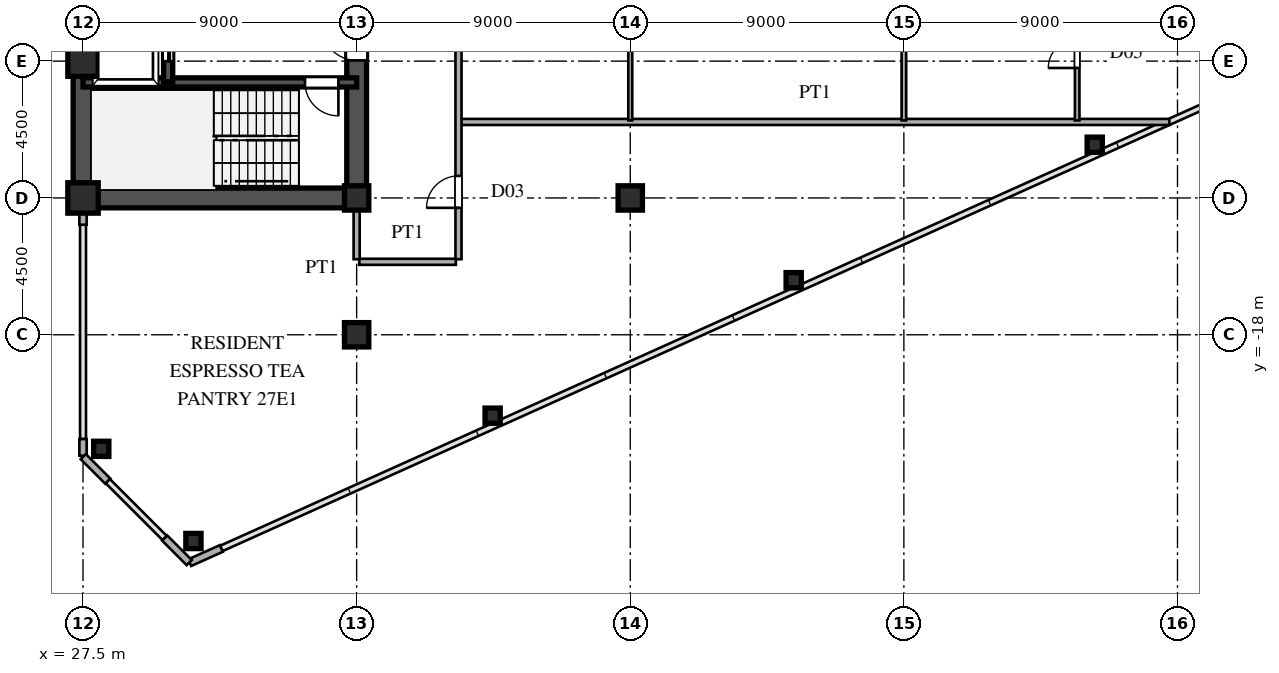
"""IFC4 building model, lengths in metres.
Left out: names, types, materials, properties, quantities, classifications, styles, units other than length and angle.
Written with IfcOpenShell. Run it as: python <this file> out.ifc"""

import sys

from ifc_helpers import new_model, si_unit, direction, frame, frame_2d, origin, origin_2d, place, context, subcontext, project, spatial, rectangle, hollow_rectangle, i_section, extrude, source, transform, mapped, element, fill, save


model = new_model("IFC4")
c1 = context("Model", 3, precision=1e-05, world=origin(), true_north=direction((0.0, 1.0)))
c2 = subcontext(c1, "Body", "Model", "MODEL_VIEW")
j1 = project(units=[si_unit("LENGTHUNIT", "METRE"), si_unit("PLANEANGLEUNIT", "RADIAN")], contexts=[c1])
p1 = place(None, origin())
s1 = spatial("IfcSite", under=j1, at=p1, CompositionType="ELEMENT")
p2 = place(p1, origin())
s2 = spatial("IfcBuilding", under=s1, at=p2, CompositionType="ELEMENT")
p3 = place(p2, frame((0.0, 0.0, 103.2)))
s3 = spatial("IfcBuildingStorey", under=s2, at=p3, CompositionType="ELEMENT", Elevation=103.2)
m1 = source(origin(), c2, "Body", "SweptSolid", [
    extrude(hollow_rectangle(XDim=1.0, YDim=1.0, WallThickness=0.042, at=origin_2d()), origin(), (0.0, 0.0, 1.0), 3.6),
])
for number, where, z_axis, x_axis in (
    (1, (27.5, -13.5, 0.0), (0.0, 0.0, 1.0), (1.0, 0.0, 0.0)),
    (2, (27.5, -9.0, 0.0), (0.0, 0.0, 1.0), (1.0, 0.0, 0.0)),
):
    element("IfcColumn", number, at=place(p3, frame(where, z_axis=z_axis, x_axis=x_axis)), inside=s3, PredefinedType="COLUMN", context=c2, shape_type="MappedRepresentation", body=[
        mapped(m1, transform((0.0, 0.0, 0.0), scale=1.0)),
    ])
m2 = source(origin(), c2, "Body", "SweptSolid", [
    extrude(i_section(OverallWidth=0.8, OverallDepth=0.8, WebThickness=0.032, FlangeThickness=0.05, at=origin_2d()), origin(), (0.0, 0.0, 1.0), 3.6),
])
for number, where, z_axis, x_axis in (
    (3, (36.5, -18.0, 0.0), (0.0, 0.0, 1.0), (1.0, 0.0, 0.0)),
    (4, (36.5, -13.5, 0.0), (0.0, 0.0, 1.0), (1.0, 0.0, 0.0)),
    (5, (45.5, -13.5, 0.0), (0.0, 0.0, 1.0), (1.0, 0.0, 0.0)),
):
    element("IfcColumn", number, at=place(p3, frame(where, z_axis=z_axis, x_axis=x_axis)), inside=s3, PredefinedType="COLUMN", context=c2, shape_type="MappedRepresentation", body=[
        mapped(m2, transform((0.0, 0.0, 0.0), scale=1.0)),
    ])
m3 = source(origin(), c2, "Body", "SweptSolid", [
    extrude(hollow_rectangle(XDim=0.5, YDim=0.5, WallThickness=0.02, at=origin_2d()), origin(), (0.0, 0.0, 1.0), 3.6),
])
for number, where, z_axis, x_axis in (
    (6, (31.131, -24.783, 0.0), (0.0, 0.0, 1.0), (1.0, 0.0, 0.0)),
    (7, (28.1, -21.751, 0.0), (0.0, 0.0, 1.0), (1.0, 0.0, 0.0)),
    (8, (40.973, -20.661, 0.0), (0.0, 0.0, 1.0), (1.0, 0.0, 0.0)),
    (9, (50.875, -16.205, 0.0), (0.0, 0.0, 1.0), (1.0, 0.0, 0.0)),
    (10, (60.778, -11.749, 0.0), (0.0, 0.0, 1.0), (1.0, 0.0, 0.0)),
):
    element("IfcColumn", number, at=place(p3, frame(where, z_axis=z_axis, x_axis=x_axis)), inside=s3, PredefinedType="COLUMN", context=c2, shape_type="MappedRepresentation", body=[
        mapped(m3, transform((0.0, 0.0, 0.0), scale=1.0)),
    ])
p4 = place(p3, frame((31.009, -25.496, 0.0), z_axis=(0.0, 0.0, 1.0), x_axis=(0.911929519623, 0.410346866979, 0.0)))
e11 = element("IfcWall", 11, at=p4, inside=s3, PredefinedType="SOLIDWALL", context=c2, shape_type="SweptSolid", body=[
    extrude(rectangle(XDim=1.14, YDim=0.24, at=frame_2d((0.57, 0.0))), origin(), (0.0, 0.0, 1.0), 3.38),
])
p5 = place(p3, frame((27.5, -21.98, 0.0), z_axis=(0.0, 0.0, 1.0), x_axis=(0.0, 1.0, 0.0)))
e12 = element("IfcWall", 12, at=p5, inside=s3, PredefinedType="SOLIDWALL", context=c2, shape_type="SweptSolid", body=[
    extrude(rectangle(XDim=0.55, YDim=0.24, at=frame_2d((0.275, 0.0))), origin(), (0.0, 0.0, 1.0), 3.38),
])
p6 = place(p3, frame((27.5, -14.38, 0.0), z_axis=(0.0, 0.0, 1.0), x_axis=(0.0, 1.0, 0.0)))
e13 = element("IfcWall", 13, at=p6, inside=s3, PredefinedType="SOLIDWALL", context=c2, shape_type="SweptSolid", body=[
    extrude(rectangle(XDim=0.55, YDim=0.24, at=frame_2d((0.275, 0.0))), origin(), (0.0, 0.0, 1.0), 2.88),
])
for number, where, z_axis, x_axis in (
    (14, (27.507, -22.007, 0.0), (0.0, 0.0, 1.0), (0.707, -0.707, 0.0)),
    (15, (30.187, -24.687, 0.0), (0.0, 0.0, 1.0), (0.707, -0.707, 0.0)),
):
    element("IfcWall", number, at=place(p3, frame(where, z_axis=z_axis, x_axis=x_axis)), inside=s3, PredefinedType="SOLIDWALL", context=c2, shape_type="SweptSolid", body=[
        extrude(rectangle(XDim=1.14, YDim=0.24, at=frame_2d((0.57, 0.0))), origin(), (0.0, 0.0, 1.0), 3.38),
    ])
p7 = place(p3, frame((27.5, -13.5, 0.0), z_axis=(0.0, 0.0, 1.0), x_axis=(0.0, 1.0, 0.0)))
e16 = element("IfcWall", 16, at=p7, inside=s3, PredefinedType="SHEAR", context=c2, shape_type="SweptSolid", body=[
    extrude(rectangle(XDim=12.2, YDim=0.65, at=frame_2d((6.1, 0.0))), origin(), (0.0, 0.0, 1.0), 3.38),
])
p8 = place(p3, frame((27.5, -13.5, 0.0), z_axis=(0.0, 0.0, 1.0), x_axis=(1.0, 0.0, 0.0)))
e17 = element("IfcWall", 17, at=p8, inside=s3, PredefinedType="SHEAR", context=c2, shape_type="SweptSolid", body=[
    extrude(rectangle(XDim=9.0, YDim=0.65, at=frame_2d((4.5, 0.0))), origin(), (0.0, 0.0, 1.0), 3.38),
])
p9 = place(p3, frame((36.5, -13.65, 0.0), z_axis=(0.0, 0.0, 1.0), x_axis=(0.0, 1.0, 0.0)))
e18 = element("IfcWall", 18, at=p9, inside=s3, PredefinedType="SHEAR", context=c2, shape_type="SweptSolid", body=[
    extrude(rectangle(XDim=7.15, YDim=0.65, at=frame_2d((3.575, 0.0))), origin(), (0.0, 0.0, 1.0), 3.38),
])
p10 = place(p9, frame((4.675, 0.0, 0.0)))
e19 = element("IfcOpeningElement", 19, at=p10, cuts=e18, PredefinedType="OPENING", context=c2, shape_type="SweptSolid", body=[
    extrude(rectangle(XDim=1.15, YDim=2.2, at=frame_2d((0.575, 1.1))), frame((0.0, 0.335, 0.0), z_axis=(0.0, -1.0, 0.0), x_axis=(1.0, 0.0, 0.0)), (0.0, 0.0, 1.0), 0.67),
])
p11 = place(p3, frame((27.5, -9.7, 0.0), z_axis=(0.0, 0.0, 1.0), x_axis=(1.0, 0.0, 0.0)))
e20 = element("IfcWall", 20, at=p11, inside=s3, PredefinedType="SHEAR", context=c2, shape_type="SweptSolid", body=[
    extrude(rectangle(XDim=9.0, YDim=0.3, at=frame_2d((4.5, 0.0))), origin(), (0.0, 0.0, 1.0), 3.38),
])
p12 = place(p11, frame((7.3, 0.0, 0.0)))
e21 = element("IfcOpeningElement", 21, at=p12, cuts=e20, PredefinedType="OPENING", context=c2, shape_type="SweptSolid", body=[
    extrude(rectangle(XDim=1.1, YDim=2.2, at=frame_2d((0.55, 1.1))), frame((0.0, 0.16, 0.0), z_axis=(0.0, -1.0, 0.0), x_axis=(1.0, 0.0, 0.0)), (0.0, 0.0, 1.0), 0.32),
])
p13 = place(p3, frame((30.3, -9.68, 0.0), z_axis=(0.0, 0.0, 1.0), x_axis=(0.0, 1.0, 0.0)))
e22 = element("IfcWall", 22, at=p13, inside=s3, PredefinedType="SHEAR", context=c2, shape_type="SweptSolid", body=[
    extrude(rectangle(XDim=2.56, YDim=0.3, at=frame_2d((1.28, 0.0))), origin(), (0.0, 0.0, 1.0), 3.38),
])
p14 = place(p13, frame((0.68, 0.0, 0.0)))
e23 = element("IfcOpeningElement", 23, at=p14, cuts=e22, PredefinedType="OPENING", context=c2, shape_type="SweptSolid", body=[
    extrude(rectangle(XDim=1.2, YDim=2.25, at=frame_2d((0.6, 1.125))), frame((0.0, 0.16, 0.0), z_axis=(0.0, -1.0, 0.0), x_axis=(1.0, 0.0, 0.0)), (0.0, 0.0, 1.0), 0.32),
])
p15 = place(p3, frame((36.585, -15.6, 0.0), z_axis=(0.0, 0.0, 1.0), x_axis=(1.0, 0.0, 0.0)))
e24 = element("IfcWall", 24, at=p15, inside=s3, PredefinedType="PARTITIONING", context=c2, shape_type="SweptSolid", body=[
    extrude(rectangle(XDim=3.18, YDim=0.2, at=frame_2d((1.59, 0.0))), origin(), (0.0, 0.0, 1.0), 3.38),
])
p16 = place(p3, frame((39.93, -11.0, 0.0), z_axis=(0.0, 0.0, 1.0), x_axis=(1.0, 0.0, 0.0)))
e25 = element("IfcWall", 25, at=p16, inside=s3, PredefinedType="PARTITIONING", context=c2, shape_type="SweptSolid", body=[
    extrude(rectangle(XDim=23.304, YDim=0.2, at=frame_2d((11.652, 0.0))), origin(), (0.0, 0.0, 1.0), 3.38),
])
p17 = place(p3, frame((36.5, -15.515, 0.0), z_axis=(0.0, 0.0, 1.0), x_axis=(0.0, 1.0, 0.0)))
e26 = element("IfcWall", 26, at=p17, inside=s3, PredefinedType="PARTITIONING", context=c2, shape_type="SweptSolid", body=[
    extrude(rectangle(XDim=1.685, YDim=0.2, at=frame_2d((0.842, 0.0))), origin(), (0.0, 0.0, 1.0), 2.68),
])
p18 = place(p3, frame((39.85, -15.515, 0.0), z_axis=(0.0, 0.0, 1.0), x_axis=(0.0, 1.0, 0.0)))
e27 = element("IfcWall", 27, at=p18, inside=s3, PredefinedType="PARTITIONING", context=c2, shape_type="SweptSolid", body=[
    extrude(rectangle(XDim=31.03, YDim=0.2, at=frame_2d((15.515, 0.0))), origin(), (0.0, 0.0, 1.0), 3.38),
])
p19 = place(p18, frame((1.69, 0.0, 0.0)))
e28 = element("IfcOpeningElement", 28, at=p19, cuts=e27, PredefinedType="OPENING", context=c2, shape_type="SweptSolid", body=[
    extrude(rectangle(XDim=1.05, YDim=2.25, at=frame_2d((0.525, 1.125))), frame((0.0, 0.11, 0.0), z_axis=(0.0, -1.0, 0.0), x_axis=(1.0, 0.0, 0.0)), (0.0, 0.0, 1.0), 0.22),
])
p20 = place(p18, frame((10.538, 0.0, 0.0)))
e29 = element("IfcOpeningElement", 29, at=p20, cuts=e27, PredefinedType="OPENING", context=c2, shape_type="SweptSolid", body=[
    extrude(rectangle(XDim=1.05, YDim=2.25, at=frame_2d((0.525, 1.125))), frame((0.0, 0.11, 0.0), z_axis=(0.0, -1.0, 0.0), x_axis=(1.0, 0.0, 0.0)), (0.0, 0.0, 1.0), 0.22),
])
p21 = place(p18, frame((24.067, 0.0, 0.0)))
e30 = element("IfcOpeningElement", 30, at=p21, cuts=e27, PredefinedType="OPENING", context=c2, shape_type="SweptSolid", body=[
    extrude(rectangle(XDim=1.05, YDim=2.25, at=frame_2d((0.525, 1.125))), frame((0.0, 0.11, 0.0), z_axis=(0.0, -1.0, 0.0), x_axis=(1.0, 0.0, 0.0)), (0.0, 0.0, 1.0), 0.22),
])
p22 = place(p3, frame((45.5, -10.95, 0.0), z_axis=(0.0, 0.0, 1.0), x_axis=(0.0, 1.0, 0.0)))
e31 = element("IfcWall", 31, at=p22, inside=s3, PredefinedType="PARTITIONING", context=c2, shape_type="SweptSolid", body=[
    extrude(rectangle(XDim=8.9, YDim=0.13, at=frame_2d((4.45, 0.0))), origin(), (0.0, 0.0, 1.0), 2.68),
])
p23 = place(p22, frame((6.923, 0.0, 0.0)))
e32 = element("IfcOpeningElement", 32, at=p23, cuts=e31, PredefinedType="OPENING", context=c2, shape_type="SweptSolid", body=[
    extrude(rectangle(XDim=0.95, YDim=2.15, at=frame_2d((0.475, 1.075))), frame((0.0, 0.075, 0.0), z_axis=(0.0, -1.0, 0.0), x_axis=(1.0, 0.0, 0.0)), (0.0, 0.0, 1.0), 0.15),
])
p24 = place(p3, frame((54.5, -10.95, 0.0), z_axis=(0.0, 0.0, 1.0), x_axis=(0.0, 1.0, 0.0)))
e33 = element("IfcWall", 33, at=p24, inside=s3, PredefinedType="PARTITIONING", context=c2, shape_type="SweptSolid", body=[
    extrude(rectangle(XDim=24.383, YDim=0.15, at=frame_2d((12.191, 0.0))), origin(), (0.0, 0.0, 1.0), 2.68),
])
p25 = place(p24, frame((6.957, 0.0, 0.0)))
e34 = element("IfcOpeningElement", 34, at=p25, cuts=e33, PredefinedType="OPENING", context=c2, shape_type="SweptSolid", body=[
    extrude(rectangle(XDim=0.95, YDim=2.15, at=frame_2d((0.475, 1.075))), frame((0.0, 0.085, 0.0), z_axis=(0.0, -1.0, 0.0), x_axis=(1.0, 0.0, 0.0)), (0.0, 0.0, 1.0), 0.17),
])
p26 = place(p24, frame((21.212, 0.0, 0.0)))
e35 = element("IfcOpeningElement", 35, at=p26, cuts=e33, PredefinedType="OPENING", context=c2, shape_type="SweptSolid", body=[
    extrude(rectangle(XDim=0.95, YDim=2.15, at=frame_2d((0.475, 1.075))), frame((0.0, 0.085, 0.0), z_axis=(0.0, -1.0, 0.0), x_axis=(1.0, 0.0, 0.0)), (0.0, 0.0, 1.0), 0.17),
])
p27 = place(p24, frame((16.018, 0.0, 0.0)))
e36 = element("IfcOpeningElement", 36, at=p27, cuts=e33, PredefinedType="OPENING", context=c2, shape_type="SweptSolid", body=[
    extrude(rectangle(XDim=0.95, YDim=2.15, at=frame_2d((0.475, 1.075))), frame((0.0, 0.085, 0.0), z_axis=(0.0, -1.0, 0.0), x_axis=(1.0, 0.0, 0.0)), (0.0, 0.0, 1.0), 0.17),
])
p28 = place(p3, frame((60.2, -10.95, 0.0), z_axis=(0.0, 0.0, 1.0), x_axis=(0.0, 1.0, 0.0)))
e37 = element("IfcWall", 37, at=p28, inside=s3, PredefinedType="PARTITIONING", context=c2, shape_type="SweptSolid", body=[
    extrude(rectangle(XDim=18.892, YDim=0.15, at=frame_2d((9.446, 0.0))), origin(), (0.0, 0.0, 1.0), 3.38),
])
p29 = place(p28, frame((1.725, 0.0, 0.0)))
e38 = element("IfcOpeningElement", 38, at=p29, cuts=e37, PredefinedType="OPENING", context=c2, shape_type="SweptSolid", body=[
    extrude(rectangle(XDim=0.95, YDim=2.15, at=frame_2d((0.475, 1.075))), frame((0.0, 0.085, 0.0), z_axis=(0.0, -1.0, 0.0), x_axis=(1.0, 0.0, 0.0)), (0.0, 0.0, 1.0), 0.17),
])
p30 = place(p28, frame((6.225, 0.0, 0.0)))
e39 = element("IfcOpeningElement", 39, at=p30, cuts=e37, PredefinedType="OPENING", context=c2, shape_type="SweptSolid", body=[
    extrude(rectangle(XDim=0.95, YDim=2.15, at=frame_2d((0.475, 1.075))), frame((0.0, 0.085, 0.0), z_axis=(0.0, -1.0, 0.0), x_axis=(1.0, 0.0, 0.0)), (0.0, 0.0, 1.0), 0.17),
])
p31 = place(p28, frame((10.725, 0.0, 0.0)))
e40 = element("IfcOpeningElement", 40, at=p31, cuts=e37, PredefinedType="OPENING", context=c2, shape_type="SweptSolid", body=[
    extrude(rectangle(XDim=0.95, YDim=2.15, at=frame_2d((0.475, 1.075))), frame((0.0, 0.085, 0.0), z_axis=(0.0, -1.0, 0.0), x_axis=(1.0, 0.0, 0.0)), (0.0, 0.0, 1.0), 0.17),
])
p32 = place(p28, frame((15.721, 0.0, 0.0)))
e41 = element("IfcOpeningElement", 41, at=p32, cuts=e37, PredefinedType="OPENING", context=c2, shape_type="SweptSolid", body=[
    extrude(rectangle(XDim=0.95, YDim=2.15, at=frame_2d((0.475, 1.075))), frame((0.0, 0.085, 0.0), z_axis=(0.0, -1.0, 0.0), x_axis=(1.0, 0.0, 0.0)), (0.0, 0.0, 1.0), 0.17),
])
m4 = source(origin(), c2, "Body", "SweptSolid", [
    extrude(rectangle(XDim=1.15, YDim=2.2, at=frame_2d((0.575, 1.1))), frame((0.0, 0.025, 0.0), z_axis=(0.0, -1.0, 0.0), x_axis=(1.0, 0.0, 0.0)), (0.0, 0.0, 1.0), 0.05),
])
p33 = place(p10, origin())
e42 = element("IfcDoor", 42, at=p33, inside=s3, OperationType="SINGLE_SWING_RIGHT", PredefinedType="DOOR", context=c2, shape_type="MappedRepresentation", body=[
    mapped(m4, transform((0.0, 0.0, 0.0), scale=1.0)),
])
fill(e19, e42)
m5 = source(origin(), c2, "Body", "SweptSolid", [
    extrude(rectangle(XDim=1.1, YDim=2.2, at=frame_2d((0.55, 1.1))), frame((0.0, 0.025, 0.0), z_axis=(0.0, -1.0, 0.0), x_axis=(1.0, 0.0, 0.0)), (0.0, 0.0, 1.0), 0.05),
])
p34 = place(p12, frame((1.1, 0.0, 0.0), z_axis=(0.0, 0.0, 1.0), x_axis=(-1.0, 0.0, 0.0)))
e43 = element("IfcDoor", 43, at=p34, inside=s3, OperationType="SINGLE_SWING_RIGHT", PredefinedType="DOOR", context=c2, shape_type="MappedRepresentation", body=[
    mapped(m5, transform((0.0, 0.0, 0.0), scale=1.0)),
])
fill(e21, e43)
m6 = source(origin(), c2, "Body", "SweptSolid", [
    extrude(rectangle(XDim=1.2, YDim=2.25, at=frame_2d((0.6, 1.125))), frame((0.0, 0.025, 0.0), z_axis=(0.0, -1.0, 0.0), x_axis=(1.0, 0.0, 0.0)), (0.0, 0.0, 1.0), 0.05),
])
p35 = place(p14, origin())
e44 = element("IfcDoor", 44, at=p35, inside=s3, OperationType="DOUBLE_DOOR_SLIDING", PredefinedType="DOOR", context=c2, shape_type="MappedRepresentation", body=[
    mapped(m6, transform((0.0, 0.0, 0.0), scale=1.0)),
])
fill(e23, e44)
m7 = source(origin(), c2, "Body", "SweptSolid", [
    extrude(rectangle(XDim=1.05, YDim=2.25, at=frame_2d((0.525, 1.125))), frame((0.0, 0.025, 0.0), z_axis=(0.0, -1.0, 0.0), x_axis=(1.0, 0.0, 0.0)), (0.0, 0.0, 1.0), 0.05),
])
p36 = place(p19, origin())
e45 = element("IfcDoor", 45, at=p36, inside=s3, OperationType="SINGLE_SWING_LEFT", PredefinedType="DOOR", context=c2, shape_type="MappedRepresentation", body=[
    mapped(m7, transform((0.0, 0.0, 0.0), scale=1.0)),
])
fill(e28, e45)
m8 = source(origin(), c2, "Body", "SweptSolid", [
    extrude(rectangle(XDim=0.95, YDim=2.15, at=frame_2d((0.475, 1.075))), frame((0.0, 0.025, 0.0), z_axis=(0.0, -1.0, 0.0), x_axis=(1.0, 0.0, 0.0)), (0.0, 0.0, 1.0), 0.05),
])
p37 = place(p29, origin())
e46 = element("IfcDoor", 46, at=p37, inside=s3, OperationType="SINGLE_SWING_LEFT", PredefinedType="DOOR", context=c2, shape_type="MappedRepresentation", body=[
    mapped(m8, transform((0.0, 0.0, 0.0), scale=1.0)),
])
fill(e38, e46)
save(model, sys.argv[1])
